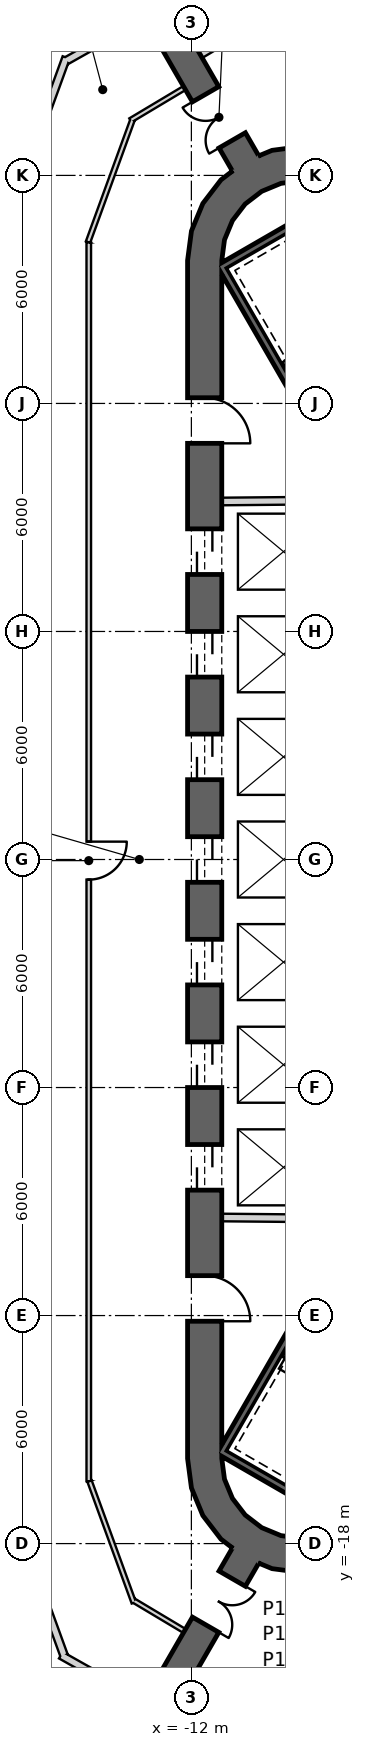
"""IFC4 building model, lengths in metres.
Left out: names, types, materials, properties, quantities, classifications, styles, units other than length and angle.
Written with IfcOpenShell. Run it as: python <this file> out.ifc"""

import sys

from ifc_helpers import new_model, si_unit, direction, frame, frame_2d, origin, place, context, subcontext, project, spatial, polyline, rectangle, outline, extrude, element, fill, save


model = new_model("IFC4")
c1 = context("Model", 3, precision=1e-05, world=origin(), true_north=direction((0.0, 1.0)))
c2 = subcontext(c1, "Body", "Model", "MODEL_VIEW")
j1 = project(units=[si_unit("LENGTHUNIT", "METRE"), si_unit("PLANEANGLEUNIT", "RADIAN")], contexts=[c1])
p1 = place(None, origin())
s1 = spatial("IfcSite", under=j1, at=p1, CompositionType="ELEMENT")
p2 = place(p1, origin())
s2 = spatial("IfcBuilding", under=s1, at=p2, CompositionType="ELEMENT")
p3 = place(p2, frame((0.0, 0.0, 45.5)))
s3 = spatial("IfcBuildingStorey", under=s2, at=p3, CompositionType="ELEMENT", Elevation=45.5)
p4 = place(p3, frame((-11.65, 15.762, 0.0), z_axis=(0.0, 0.0, 1.0), x_axis=(0.0, -1.0, 0.0)))
e1 = element("IfcWall", 1, at=p4, inside=s3, PredefinedType="SHEAR", context=c2, shape_type="SweptSolid", body=[
    extrude(rectangle(XDim=31.523, YDim=0.9, at=frame_2d((15.762, 0.0))), origin(), (0.0, 0.0, 1.0), 4.1),
])
p5 = place(p4, frame((7.062, 0.0, 0.0)))
e2 = element("IfcOpeningElement", 2, at=p5, cuts=e1, PredefinedType="OPENING", context=c2, shape_type="SweptSolid", body=[
    extrude(rectangle(XDim=1.2, YDim=2.4, at=frame_2d((0.6, 1.2))), frame((0.0, 0.46, 0.0), z_axis=(0.0, -1.0, 0.0), x_axis=(1.0, 0.0, 0.0)), (0.0, 0.0, 1.0), 0.92),
])
p6 = place(p4, frame((9.762, 0.0, 0.0)))
e3 = element("IfcOpeningElement", 3, at=p6, cuts=e1, PredefinedType="OPENING", context=c2, shape_type="SweptSolid", body=[
    extrude(rectangle(XDim=1.2, YDim=2.4, at=frame_2d((0.6, 1.2))), frame((0.0, 0.46, 0.0), z_axis=(0.0, -1.0, 0.0), x_axis=(1.0, 0.0, 0.0)), (0.0, 0.0, 1.0), 0.92),
])
p7 = place(p4, frame((12.462, 0.0, 0.0)))
e4 = element("IfcOpeningElement", 4, at=p7, cuts=e1, PredefinedType="OPENING", context=c2, shape_type="SweptSolid", body=[
    extrude(rectangle(XDim=1.2, YDim=2.4, at=frame_2d((0.6, 1.2))), frame((0.0, 0.46, 0.0), z_axis=(0.0, -1.0, 0.0), x_axis=(1.0, 0.0, 0.0)), (0.0, 0.0, 1.0), 0.92),
])
p8 = place(p4, frame((15.162, 0.0, 0.0)))
e5 = element("IfcOpeningElement", 5, at=p8, cuts=e1, PredefinedType="OPENING", context=c2, shape_type="SweptSolid", body=[
    extrude(rectangle(XDim=1.2, YDim=2.4, at=frame_2d((0.6, 1.2))), frame((0.0, 0.46, 0.0), z_axis=(0.0, -1.0, 0.0), x_axis=(1.0, 0.0, 0.0)), (0.0, 0.0, 1.0), 0.92),
])
p9 = place(p4, frame((17.862, 0.0, 0.0)))
e6 = element("IfcOpeningElement", 6, at=p9, cuts=e1, PredefinedType="OPENING", context=c2, shape_type="SweptSolid", body=[
    extrude(rectangle(XDim=1.2, YDim=2.4, at=frame_2d((0.6, 1.2))), frame((0.0, 0.46, 0.0), z_axis=(0.0, -1.0, 0.0), x_axis=(1.0, 0.0, 0.0)), (0.0, 0.0, 1.0), 0.92),
])
p10 = place(p4, frame((20.562, 0.0, 0.0)))
e7 = element("IfcOpeningElement", 7, at=p10, cuts=e1, PredefinedType="OPENING", context=c2, shape_type="SweptSolid", body=[
    extrude(rectangle(XDim=1.2, YDim=2.4, at=frame_2d((0.6, 1.2))), frame((0.0, 0.46, 0.0), z_axis=(0.0, -1.0, 0.0), x_axis=(1.0, 0.0, 0.0)), (0.0, 0.0, 1.0), 0.92),
])
p11 = place(p4, frame((23.262, 0.0, 0.0)))
e8 = element("IfcOpeningElement", 8, at=p11, cuts=e1, PredefinedType="OPENING", context=c2, shape_type="SweptSolid", body=[
    extrude(rectangle(XDim=1.2, YDim=2.4, at=frame_2d((0.6, 1.2))), frame((0.0, 0.46, 0.0), z_axis=(0.0, -1.0, 0.0), x_axis=(1.0, 0.0, 0.0)), (0.0, 0.0, 1.0), 0.92),
])
p12 = place(p4, frame((3.612, 0.0, 0.0)))
e9 = element("IfcOpeningElement", 9, at=p12, cuts=e1, PredefinedType="OPENING", context=c2, shape_type="SweptSolid", body=[
    extrude(rectangle(XDim=1.2, YDim=2.4, at=frame_2d((0.6, 1.2))), frame((0.0, 0.46, 0.0), z_axis=(0.0, -1.0, 0.0), x_axis=(1.0, 0.0, 0.0)), (0.0, 0.0, 1.0), 0.92),
])
p13 = place(p4, frame((26.712, 0.0, 0.0)))
e10 = element("IfcOpeningElement", 10, at=p13, cuts=e1, PredefinedType="OPENING", context=c2, shape_type="SweptSolid", body=[
    extrude(rectangle(XDim=1.2, YDim=2.4, at=frame_2d((0.6, 1.2))), frame((0.0, 0.46, 0.0), z_axis=(0.0, -1.0, 0.0), x_axis=(1.0, 0.0, 0.0)), (0.0, 0.0, 1.0), 0.92),
])
p14 = place(p3, origin())
e11 = element("IfcWall", 11, at=p14, inside=s3, PredefinedType="SHEAR", context=c2, shape_type="SweptSolid", body=[
    extrude(outline(polyline([(-7.6, 18.36), (-8.323, 18.659), (-9.1, 18.762), (-9.876, 18.659), (-10.6, 18.36), (-11.221, 17.883), (-11.698, 17.262), (-11.998, 16.538), (-12.1, 15.762), (-11.2, 15.762), (-11.128, 16.305), (-10.919, 16.812), (-10.585, 17.247), (-10.15, 17.58), (-9.644, 17.79), (-9.1, 17.862), (-8.556, 17.79), (-8.05, 17.58), (-7.6, 18.36)])), origin(), (0.0, 0.0, 1.0), 4.1),
])
p15 = place(p3, origin())
e12 = element("IfcWall", 12, at=p15, inside=s3, PredefinedType="SHEAR", context=c2, shape_type="SweptSolid", body=[
    extrude(outline(polyline([(-12.1, -15.762), (-11.998, -16.538), (-11.698, -17.262), (-11.221, -17.883), (-10.6, -18.36), (-9.876, -18.659), (-9.1, -18.762), (-8.323, -18.659), (-7.6, -18.36), (-8.05, -17.58), (-8.556, -17.79), (-9.1, -17.862), (-9.644, -17.79), (-10.15, -17.58), (-10.585, -17.247), (-10.919, -16.812), (-11.128, -16.305), (-11.2, -15.762), (-12.1, -15.762)])), origin(), (0.0, 0.0, 1.0), 4.1),
])
p16 = place(p3, frame((-10.575, 18.316, 0.0), z_axis=(0.0, 0.0, 1.0), x_axis=(-0.499996272984, 0.866027555568, 0.0)))
e13 = element("IfcWall", 13, at=p16, inside=s3, PredefinedType="SHEAR", context=c2, shape_type="SweptSolid", body=[
    extrude(rectangle(XDim=14.098, YDim=0.8, at=frame_2d((7.049, 0.0))), origin(), (0.0, 0.0, 1.0), 4.1),
])
p17 = place(p16, frame((0.7, 0.0, 0.0)))
e14 = element("IfcOpeningElement", 14, at=p17, cuts=e13, PredefinedType="OPENING", context=c2, shape_type="SweptSolid", body=[
    extrude(rectangle(XDim=1.4, YDim=2.4, at=frame_2d((0.7, 1.2))), frame((0.0, 0.41, 0.0), z_axis=(0.0, -1.0, 0.0), x_axis=(1.0, 0.0, 0.0)), (0.0, 0.0, 1.0), 0.82),
])
p18 = place(p3, frame((-10.575, -18.316, 0.0), z_axis=(0.0, 0.0, 1.0), x_axis=(-0.499996272984, -0.866027555568, 0.0)))
e15 = element("IfcWall", 15, at=p18, inside=s3, PredefinedType="SHEAR", context=c2, shape_type="SweptSolid", body=[
    extrude(rectangle(XDim=14.098, YDim=0.8, at=frame_2d((7.049, 0.0))), origin(), (0.0, 0.0, 1.0), 4.1),
])
p19 = place(p18, frame((0.7, 0.0, 0.0)))
e16 = element("IfcOpeningElement", 16, at=p19, cuts=e15, PredefinedType="OPENING", context=c2, shape_type="SweptSolid", body=[
    extrude(rectangle(XDim=1.4, YDim=2.4, at=frame_2d((0.7, 1.2))), frame((0.0, 0.41, 0.0), z_axis=(0.0, -1.0, 0.0), x_axis=(1.0, 0.0, 0.0)), (0.0, 0.0, 1.0), 0.82),
])
p20 = place(p3, frame((-11.2, 9.42, 0.0), z_axis=(0.0, 0.0, 1.0), x_axis=(0.999957167047, 0.009255488683, 0.0)))
e17 = element("IfcWall", 17, at=p20, inside=s3, PredefinedType="PLUMBINGWALL", context=c2, shape_type="SweptSolid", body=[
    extrude(rectangle(XDim=3.35, YDim=0.2, at=frame_2d((1.675, 0.0))), origin(), (0.0, 0.0, 1.0), 3.8),
])
p21 = place(p3, frame((-8.05, -9.449, 0.0), z_axis=(0.0, 0.0, 1.0), x_axis=(-0.999957467379, 0.009222983926, 0.0)))
e18 = element("IfcWall", 18, at=p21, inside=s3, PredefinedType="PLUMBINGWALL", context=c2, shape_type="SweptSolid", body=[
    extrude(rectangle(XDim=3.15, YDim=0.2, at=frame_2d((1.575, 0.0))), origin(), (0.0, 0.0, 1.0), 3.8),
])
p22 = place(p3, frame((-11.245, 15.678, -0.3), z_axis=(0.0, 0.0, 1.0), x_axis=(0.499977274689, -0.866038523851, 0.0)))
e19 = element("IfcWall", 19, at=p22, inside=s3, PredefinedType="SHEAR", context=c2, shape_type="SweptSolid", body=[
    extrude(rectangle(XDim=8.1, YDim=0.2, at=frame_2d((4.05, 0.0))), origin(), (0.0, 0.0, 1.0), 4.1),
])
for number, where, z_axis, x_axis in (
    (20, (-7.818, 17.541, -0.3), (0.0, 0.0, 1.0), (-0.866, -0.5, 0.0)),
    (21, (-11.282, -15.541, -0.3), (0.0, 0.0, 1.0), (0.866, -0.5, 0.0)),
):
    element("IfcWall", number, at=place(p3, frame(where, z_axis=z_axis, x_axis=x_axis)), inside=s3, PredefinedType="SHEAR", context=c2, shape_type="SweptSolid", body=[
        extrude(rectangle(XDim=3.8, YDim=0.2, at=frame_2d((1.9, 0.0))), origin(), (0.0, 0.0, 1.0), 4.1),
    ])
p23 = place(p3, frame((-7.196, -8.663, -0.3), z_axis=(0.0, 0.0, 1.0), x_axis=(-0.499997992926, -0.866026562566, 0.0)))
e22 = element("IfcWall", 22, at=p23, inside=s3, PredefinedType="SHEAR", context=c2, shape_type="SweptSolid", body=[
    extrude(rectangle(XDim=7.9, YDim=0.2, at=frame_2d((3.95, 0.0))), origin(), (0.0, 0.0, 1.0), 4.1),
])
p24 = place(p3, frame((-12.181, 20.299, 0.0), z_axis=(0.0, 0.0, 1.0), x_axis=(-0.8583241935, -0.51310776534, 0.0)))
e23 = element("IfcWall", 23, at=p24, inside=s3, PredefinedType="PARTITIONING", context=c2, shape_type="SweptSolid", body=[
    extrude(rectangle(XDim=1.656, YDim=0.12, at=frame_2d((0.828, 0.0))), origin(), (0.0, 0.0, 1.0), 3.8),
])
p25 = place(p3, frame((-13.549, 19.461, 0.0), z_axis=(0.0, 0.0, 1.0), x_axis=(-0.341989191955, -0.939703885586, 0.0)))
e24 = element("IfcWall", 24, at=p25, inside=s3, PredefinedType="PARTITIONING", context=c2, shape_type="SweptSolid", body=[
    extrude(rectangle(XDim=3.425, YDim=0.12, at=frame_2d((1.712, 0.0))), origin(), (0.0, 0.0, 1.0), 2.88),
])
p26 = place(p3, frame((-14.7, 16.24, 0.0), z_axis=(0.0, 0.0, 1.0), x_axis=(0.0, -1.0, 0.0)))
e25 = element("IfcWall", 25, at=p26, inside=s3, PredefinedType="PARTITIONING", context=c2, shape_type="SweptSolid", body=[
    extrude(rectangle(XDim=32.599, YDim=0.12, at=frame_2d((16.299, 0.0))), origin(), (0.0, 0.0, 1.0), 2.98),
])
p27 = place(p26, frame((15.77, 0.0, 0.0)))
e26 = element("IfcOpeningElement", 26, at=p27, cuts=e25, PredefinedType="OPENING", context=c2, shape_type="SweptSolid", body=[
    extrude(rectangle(XDim=1.0, YDim=2.1, at=frame_2d((0.5, 1.05))), frame((0.0, 0.07, 0.0), z_axis=(0.0, -1.0, 0.0), x_axis=(1.0, 0.0, 0.0)), (0.0, 0.0, 1.0), 0.14),
])
p28 = place(p3, frame((-14.679, -16.356, 0.0), z_axis=(0.0, 0.0, 1.0), x_axis=(0.342002052592, -0.939699205077, 0.0)))
e27 = element("IfcWall", 27, at=p28, inside=s3, PredefinedType="PARTITIONING", context=c2, shape_type="SweptSolid", body=[
    extrude(rectangle(XDim=3.406, YDim=0.12, at=frame_2d((1.703, 0.0))), origin(), (0.0, 0.0, 1.0), 2.88),
])
p29 = place(p3, frame((-13.516, -19.501, 0.0), z_axis=(0.0, 0.0, 1.0), x_axis=(0.858336816023, -0.513086649856, 0.0)))
e28 = element("IfcWall", 28, at=p29, inside=s3, PredefinedType="PARTITIONING", context=c2, shape_type="SweptSolid", body=[
    extrude(rectangle(XDim=1.555, YDim=0.12, at=frame_2d((0.777, 0.0))), origin(), (0.0, 0.0, 1.0), 3.8),
])
p30 = place(p3, frame((-15.435, -20.935, 0.0), z_axis=(0.0, 0.0, 1.0), x_axis=(0.871392892797, -0.490585799206, 0.0)))
e29 = element("IfcWall", 29, at=p30, inside=s3, PredefinedType="PARTITIONING", context=c2, shape_type="SweptSolid", body=[
    extrude(rectangle(XDim=2.5, YDim=0.2, at=frame_2d((1.25, 0.0))), origin(), (0.0, 0.0, 1.0), 3.8),
])
p31 = place(p3, frame((-16.934, -16.594, 0.0), z_axis=(0.0, 0.0, 1.0), x_axis=(0.342009657388, -0.939696437289, 0.0)))
e30 = element("IfcWall", 30, at=p31, inside=s3, PredefinedType="PARTITIONING", context=c2, shape_type="SweptSolid", body=[
    extrude(rectangle(XDim=4.632, YDim=0.2, at=frame_2d((2.316, 0.0))), origin(), (0.0, 0.0, 1.0), 2.88),
])
p32 = place(p3, frame((-15.293, 21.102, 0.0), z_axis=(0.0, 0.0, 1.0), x_axis=(-0.341981820704, -0.939706568195, 0.0)))
e31 = element("IfcWall", 31, at=p32, inside=s3, PredefinedType="PARTITIONING", context=c2, shape_type="SweptSolid", body=[
    extrude(rectangle(XDim=4.597, YDim=0.2, at=frame_2d((2.299, 0.0))), origin(), (0.0, 0.0, 1.0), 2.88),
])
p33 = place(p3, frame((-13.257, 22.161, 0.0), z_axis=(0.0, 0.0, 1.0), x_axis=(-0.871385546515, -0.49059884766, 0.0)))
e32 = element("IfcWall", 32, at=p33, inside=s3, PredefinedType="PARTITIONING", context=c2, shape_type="SweptSolid", body=[
    extrude(rectangle(XDim=2.334, YDim=0.2, at=frame_2d((1.167, 0.0))), origin(), (0.0, 0.0, 1.0), 3.8),
])
p34 = place(p3, frame((-10.118, 22.157, 0.0), z_axis=(0.0, 0.0, 1.0), x_axis=(-0.859118225537, -0.511777172752, 0.0)))
e33 = element("IfcWall", 33, at=p34, inside=s3, PredefinedType="PARTITIONING", context=c2, shape_type="SweptSolid", body=[
    extrude(rectangle(XDim=1.917, YDim=0.2, at=frame_2d((0.958, 0.0))), origin(), (0.0, 0.0, 1.0), 3.8),
])
p35 = place(p27, origin())
e34 = element("IfcDoor", 34, at=p35, inside=s3, OperationType="SINGLE_SWING_RIGHT", PredefinedType="NOTDEFINED", context=c2, shape_type="SweptSolid", body=[
    extrude(rectangle(XDim=1.0, YDim=2.1, at=frame_2d((0.5, 1.05))), frame((0.0, 0.025, 0.0), z_axis=(0.0, -1.0, 0.0), x_axis=(1.0, 0.0, 0.0)), (0.0, 0.0, 1.0), 0.05),
])
fill(e26, e34)
p36 = place(p5, origin())
e35 = element("IfcDoor", 35, at=p36, inside=s3, OperationType="SLIDING_TO_LEFT", PredefinedType="USERDEFINED", context=c2, shape_type="SweptSolid", body=[
    extrude(rectangle(XDim=1.2, YDim=2.4, at=frame_2d((0.6, 1.2))), frame((0.0, 0.025, 0.0), z_axis=(0.0, -1.0, 0.0), x_axis=(1.0, 0.0, 0.0)), (0.0, 0.0, 1.0), 0.05),
])
fill(e2, e35)
p37 = place(p6, origin())
e36 = element("IfcDoor", 36, at=p37, inside=s3, OperationType="SLIDING_TO_LEFT", PredefinedType="USERDEFINED", context=c2, shape_type="SweptSolid", body=[
    extrude(rectangle(XDim=1.2, YDim=2.4, at=frame_2d((0.6, 1.2))), frame((0.0, 0.025, 0.0), z_axis=(0.0, -1.0, 0.0), x_axis=(1.0, 0.0, 0.0)), (0.0, 0.0, 1.0), 0.05),
])
fill(e3, e36)
p38 = place(p7, origin())
e37 = element("IfcDoor", 37, at=p38, inside=s3, OperationType="SLIDING_TO_LEFT", PredefinedType="USERDEFINED", context=c2, shape_type="SweptSolid", body=[
    extrude(rectangle(XDim=1.2, YDim=2.4, at=frame_2d((0.6, 1.2))), frame((0.0, 0.025, 0.0), z_axis=(0.0, -1.0, 0.0), x_axis=(1.0, 0.0, 0.0)), (0.0, 0.0, 1.0), 0.05),
])
fill(e4, e37)
p39 = place(p8, origin())
e38 = element("IfcDoor", 38, at=p39, inside=s3, OperationType="SLIDING_TO_LEFT", PredefinedType="USERDEFINED", context=c2, shape_type="SweptSolid", body=[
    extrude(rectangle(XDim=1.2, YDim=2.4, at=frame_2d((0.6, 1.2))), frame((0.0, 0.025, 0.0), z_axis=(0.0, -1.0, 0.0), x_axis=(1.0, 0.0, 0.0)), (0.0, 0.0, 1.0), 0.05),
])
fill(e5, e38)
p40 = place(p9, origin())
e39 = element("IfcDoor", 39, at=p40, inside=s3, OperationType="SLIDING_TO_LEFT", PredefinedType="USERDEFINED", context=c2, shape_type="SweptSolid", body=[
    extrude(rectangle(XDim=1.2, YDim=2.4, at=frame_2d((0.6, 1.2))), frame((0.0, 0.025, 0.0), z_axis=(0.0, -1.0, 0.0), x_axis=(1.0, 0.0, 0.0)), (0.0, 0.0, 1.0), 0.05),
])
fill(e6, e39)
p41 = place(p10, origin())
e40 = element("IfcDoor", 40, at=p41, inside=s3, OperationType="SLIDING_TO_LEFT", PredefinedType="USERDEFINED", context=c2, shape_type="SweptSolid", body=[
    extrude(rectangle(XDim=1.2, YDim=2.4, at=frame_2d((0.6, 1.2))), frame((0.0, 0.025, 0.0), z_axis=(0.0, -1.0, 0.0), x_axis=(1.0, 0.0, 0.0)), (0.0, 0.0, 1.0), 0.05),
])
fill(e7, e40)
p42 = place(p11, origin())
e41 = element("IfcDoor", 41, at=p42, inside=s3, OperationType="SLIDING_TO_LEFT", PredefinedType="USERDEFINED", context=c2, shape_type="SweptSolid", body=[
    extrude(rectangle(XDim=1.2, YDim=2.4, at=frame_2d((0.6, 1.2))), frame((0.0, 0.025, 0.0), z_axis=(0.0, -1.0, 0.0), x_axis=(1.0, 0.0, 0.0)), (0.0, 0.0, 1.0), 0.05),
])
fill(e8, e41)
p43 = place(p12, origin())
e42 = element("IfcDoor", 42, at=p43, inside=s3, OperationType="SINGLE_SWING_RIGHT", PredefinedType="USERDEFINED", context=c2, shape_type="SweptSolid", body=[
    extrude(rectangle(XDim=1.2, YDim=2.4, at=frame_2d((0.6, 1.2))), frame((0.0, 0.025, 0.0), z_axis=(0.0, -1.0, 0.0), x_axis=(1.0, 0.0, 0.0)), (0.0, 0.0, 1.0), 0.05),
])
fill(e9, e42)
p44 = place(p13, origin())
e43 = element("IfcDoor", 43, at=p44, inside=s3, OperationType="SINGLE_SWING_LEFT", PredefinedType="USERDEFINED", context=c2, shape_type="SweptSolid", body=[
    extrude(rectangle(XDim=1.2, YDim=2.4, at=frame_2d((0.6, 1.2))), frame((0.0, 0.025, 0.0), z_axis=(0.0, -1.0, 0.0), x_axis=(1.0, 0.0, 0.0)), (0.0, 0.0, 1.0), 0.05),
])
fill(e10, e43)
p45 = place(p17, origin())
e44 = element("IfcDoor", 44, at=p45, inside=s3, OperationType="DOUBLE_DOOR_SINGLE_SWING", PredefinedType="NOTDEFINED", context=c2, shape_type="SweptSolid", body=[
    extrude(rectangle(XDim=1.4, YDim=2.4, at=frame_2d((0.7, 1.2))), frame((0.0, 0.025, 0.0), z_axis=(0.0, -1.0, 0.0), x_axis=(1.0, 0.0, 0.0)), (0.0, 0.0, 1.0), 0.05),
])
fill(e14, e44)
p46 = place(p19, origin())
e45 = element("IfcDoor", 45, at=p46, inside=s3, OperationType="DOUBLE_DOOR_SINGLE_SWING", PredefinedType="NOTDEFINED", context=c2, shape_type="SweptSolid", body=[
    extrude(rectangle(XDim=1.4, YDim=2.4, at=frame_2d((0.7, 1.2))), frame((0.0, 0.025, 0.0), z_axis=(0.0, -1.0, 0.0), x_axis=(1.0, 0.0, 0.0)), (0.0, 0.0, 1.0), 0.05),
])
fill(e16, e45)
save(model, sys.argv[1])
